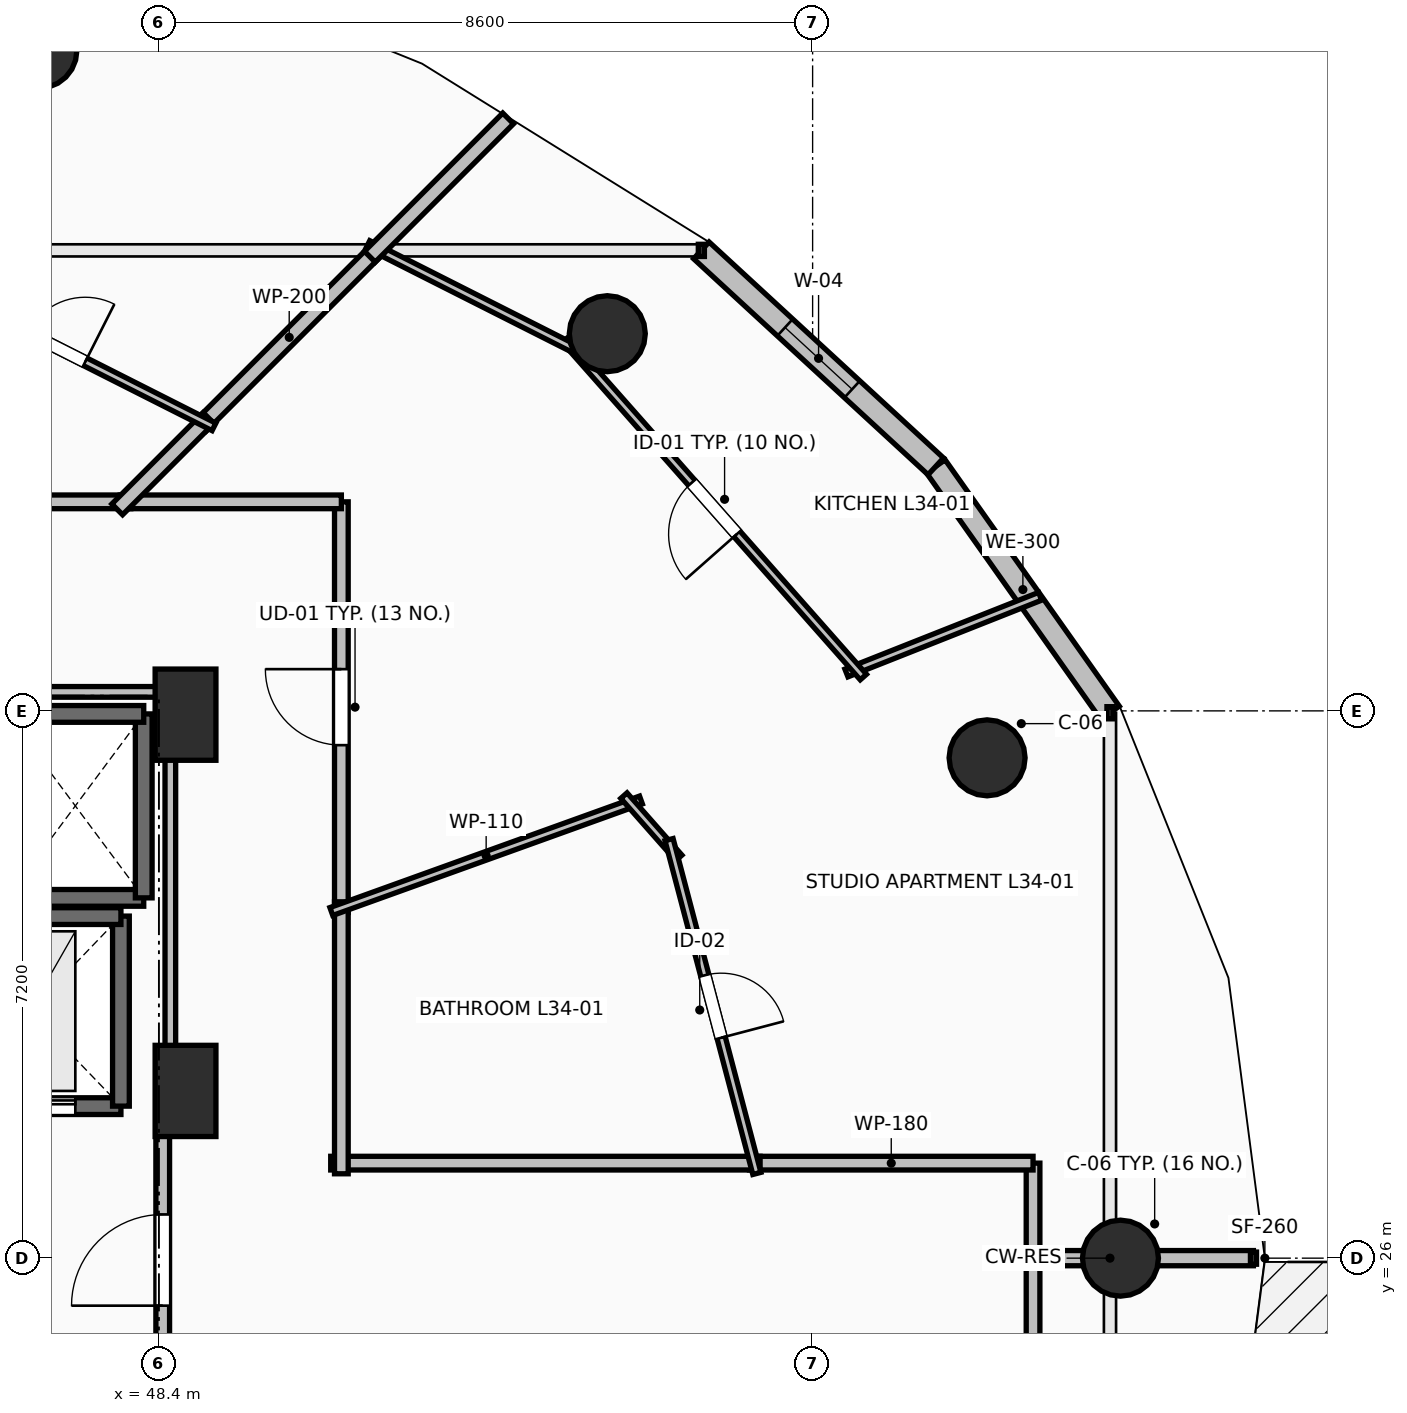
"""IFC4 building model, lengths in metres.
Left out: names, types, materials, properties, quantities, classifications, styles, units other than length and angle.
Written with IfcOpenShell. Run it as: python <this file> out.ifc"""

import sys

from ifc_helpers import new_model, si_unit, direction, frame, frame_2d, origin, origin_2d, place, context, subcontext, project, spatial, rectangle, circle, extrude, element, fill, save


model = new_model("IFC4")
c1 = context("Model", 3, precision=1e-05, world=origin(), true_north=direction((0.0, 1.0)))
c2 = subcontext(c1, "Body", "Model", "MODEL_VIEW")
j1 = project(units=[si_unit("LENGTHUNIT", "METRE"), si_unit("PLANEANGLEUNIT", "RADIAN")], contexts=[c1])
p1 = place(None, origin())
s1 = spatial("IfcSite", under=j1, at=p1, CompositionType="ELEMENT")
p2 = place(p1, origin())
s2 = spatial("IfcBuilding", under=s1, at=p2, CompositionType="ELEMENT")
p3 = place(p2, frame((0.0, 0.0, 129.1)))
s3 = spatial("IfcBuildingStorey", under=s2, at=p3, CompositionType="ELEMENT", Elevation=129.1)
for number, where, z_axis, x_axis in (
    (1, (61.05, 26.0, 0.0), (0.0, 0.0, 1.0), (1.0, 0.0, 0.0)),
    (2, (59.295, 32.582, 0.0), (0.0, 0.0, 1.0), (0.924, 0.383, 0.0)),
    (3, (54.299, 38.162, 0.0), (0.0, 0.0, 1.0), (0.707, 0.707, 0.0)),
    (4, (46.821, 41.891, 0.0), (0.0, 0.0, 1.0), (0.383, 0.924, 0.0)),
):
    element("IfcColumn", number, at=place(p3, frame(where, z_axis=z_axis, x_axis=x_axis)), inside=s3, PredefinedType="COLUMN", context=c2, shape_type="SweptSolid", body=[
        extrude(circle(Radius=0.5, at=origin_2d()), origin(), (0.0, 0.0, 1.0), 3.5),
    ])
for number, where, z_axis, x_axis in (
    (5, (48.75, 33.15, 0.0), (0.0, 0.0, 1.0), (1.0, 0.0, 0.0)),
    (6, (48.75, 28.2, 0.0), (0.0, 0.0, 1.0), (1.0, 0.0, 0.0)),
):
    element("IfcColumn", number, at=place(p3, frame(where, z_axis=z_axis, x_axis=x_axis)), inside=s3, PredefinedType="PILASTER", context=c2, shape_type="SweptSolid", body=[
        extrude(rectangle(XDim=0.8, YDim=1.2, at=origin_2d()), origin(), (0.0, 0.0, 1.0), 3.5),
    ])
p4 = place(p3, frame((60.912, 33.175, 0.0), z_axis=(0.0, 0.0, 1.0), x_axis=(-0.577269753207, 0.816553508371, 0.0)))
e7 = element("IfcWall", 7, at=p4, inside=s3, PredefinedType="STANDARD", context=c2, shape_type="SweptSolid", body=[
    extrude(rectangle(XDim=3.97, YDim=0.3, at=frame_2d((1.985, 0.0))), origin(), (0.0, 0.0, 1.0), 3.24),
])
p5 = place(p3, frame((58.62, 36.417, 0.0), z_axis=(0.0, 0.0, 1.0), x_axis=(-0.735477154165, 0.677549522693, 0.0)))
e8 = element("IfcWall", 8, at=p5, inside=s3, PredefinedType="STANDARD", context=c2, shape_type="SweptSolid", body=[
    extrude(rectangle(XDim=4.194, YDim=0.3, at=frame_2d((2.097, 0.0))), origin(), (0.0, 0.0, 1.0), 3.24),
])
p6 = place(p5, frame((1.497, 0.0, 0.85)))
e9 = element("IfcOpeningElement", 9, at=p6, cuts=e8, PredefinedType="OPENING", context=c2, shape_type="SweptSolid", body=[
    extrude(rectangle(XDim=1.2, YDim=2.1, at=frame_2d((0.6, 1.05))), frame((0.0, 0.165, 0.0), z_axis=(0.0, -1.0, 0.0), x_axis=(1.0, 0.0, 0.0)), (0.0, 0.0, 1.0), 0.33),
])
p7 = place(p3, frame((46.4, 30.74, 0.0), z_axis=(0.0, 0.0, 1.0), x_axis=(1.0, 0.0, 0.0)))
e10 = element("IfcWall", 10, at=p7, inside=s3, PredefinedType="SOLIDWALL", context=c2, shape_type="SweptSolid", body=[
    extrude(rectangle(XDim=1.8, YDim=0.22, at=frame_2d((0.9, 0.0))), origin(), (0.0, 0.0, 1.0), 3.24),
])
p8 = place(p3, frame((48.2, 30.74, 0.0), z_axis=(0.0, 0.0, 1.0), x_axis=(0.0, 1.0, 0.0)))
e11 = element("IfcWall", 11, at=p8, inside=s3, PredefinedType="SOLIDWALL", context=c2, shape_type="SweptSolid", body=[
    extrude(rectangle(XDim=2.42, YDim=0.22, at=frame_2d((1.21, 0.0))), origin(), (0.0, 0.0, 1.0), 3.24),
])
p9 = place(p3, frame((48.2, 33.16, 0.0), z_axis=(0.0, 0.0, 1.0), x_axis=(-1.0, 0.0, 0.0)))
e12 = element("IfcWall", 12, at=p9, inside=s3, PredefinedType="SOLIDWALL", context=c2, shape_type="SweptSolid", body=[
    extrude(rectangle(XDim=1.8, YDim=0.22, at=frame_2d((0.9, 0.0))), origin(), (0.0, 0.0, 1.0), 3.24),
])
p10 = place(p3, frame((45.5, 28.0, 0.0), z_axis=(0.0, 0.0, 1.0), x_axis=(1.0, 0.0, 0.0)))
e13 = element("IfcWall", 13, at=p10, inside=s3, PredefinedType="SHEAR", context=c2, shape_type="SweptSolid", body=[
    extrude(rectangle(XDim=2.4, YDim=0.22, at=frame_2d((1.2, 0.0))), origin(), (0.0, 0.0, 1.0), 3.24),
])
p11 = place(p10, frame((0.6, 0.0, 0.0)))
e14 = element("IfcOpeningElement", 14, at=p11, cuts=e13, PredefinedType="OPENING", context=c2, shape_type="SweptSolid", body=[
    extrude(rectangle(XDim=1.2, YDim=2.2, at=frame_2d((0.6, 1.1))), frame((0.0, 0.125, 0.0), z_axis=(0.0, -1.0, 0.0), x_axis=(1.0, 0.0, 0.0)), (0.0, 0.0, 1.0), 0.25),
])
p12 = place(p3, frame((47.9, 28.0, 0.0), z_axis=(0.0, 0.0, 1.0), x_axis=(0.0, 1.0, 0.0)))
e15 = element("IfcWall", 15, at=p12, inside=s3, PredefinedType="SHEAR", context=c2, shape_type="SweptSolid", body=[
    extrude(rectangle(XDim=2.5, YDim=0.22, at=frame_2d((1.25, 0.0))), origin(), (0.0, 0.0, 1.0), 3.24),
])
p13 = place(p3, frame((47.9, 30.5, 0.0), z_axis=(0.0, 0.0, 1.0), x_axis=(-1.0, 0.0, 0.0)))
e16 = element("IfcWall", 16, at=p13, inside=s3, PredefinedType="SHEAR", context=c2, shape_type="SweptSolid", body=[
    extrude(rectangle(XDim=2.4, YDim=0.22, at=frame_2d((1.2, 0.0))), origin(), (0.0, 0.0, 1.0), 3.24),
])
p14 = place(p3, frame((48.45, 23.95, 0.0), z_axis=(0.0, 0.0, 1.0), x_axis=(0.0, 1.0, 0.0)))
e17 = element("IfcWall", 17, at=p14, inside=s3, PredefinedType="PARTITIONING", context=c2, shape_type="SweptSolid", body=[
    extrude(rectangle(XDim=4.05, YDim=0.18, at=frame_2d((2.025, 0.0))), origin(), (0.0, 0.0, 1.0), 3.24),
])
p15 = place(p14, frame((1.425, 0.0, 0.0)))
e18 = element("IfcOpeningElement", 18, at=p15, cuts=e17, PredefinedType="OPENING", context=c2, shape_type="SweptSolid", body=[
    extrude(rectangle(XDim=1.2, YDim=2.15, at=frame_2d((0.6, 1.075))), frame((0.0, 0.105, 0.0), z_axis=(0.0, -1.0, 0.0), x_axis=(1.0, 0.0, 0.0)), (0.0, 0.0, 1.0), 0.21),
])
p16 = place(p3, frame((59.9, 25.94, 0.0), z_axis=(0.0, 0.0, 1.0), x_axis=(0.0, 1.0, 0.0)))
e19 = element("IfcWall", 19, at=p16, inside=s3, PredefinedType="PARTITIONING", context=c2, shape_type="SweptSolid", body=[
    extrude(rectangle(XDim=1.31, YDim=0.18, at=frame_2d((0.655, 0.0))), origin(), (0.0, 0.0, 1.0), 2.432),
])
p17 = place(p3, frame((59.9, 27.25, 0.0), z_axis=(0.0, 0.0, 1.0), x_axis=(-1.0, 0.0, 0.0)))
e20 = element("IfcWall", 20, at=p17, inside=s3, PredefinedType="PARTITIONING", context=c2, shape_type="SweptSolid", body=[
    extrude(rectangle(XDim=3.731, YDim=0.18, at=frame_2d((1.865, 0.0))), origin(), (0.0, 0.0, 1.0), 2.874),
])
p18 = place(p3, frame((50.8, 30.548, 0.0), z_axis=(0.0, 0.0, 1.0), x_axis=(0.0, 1.0, 0.0)))
e21 = element("IfcWall", 21, at=p18, inside=s3, PredefinedType="PARTITIONING", context=c2, shape_type="SweptSolid", body=[
    extrude(rectangle(XDim=5.402, YDim=0.18, at=frame_2d((2.701, 0.0))), origin(), (0.0, 0.0, 1.0), 2.432),
])
p19 = place(p18, frame((2.201, 0.0, 0.0)))
e22 = element("IfcOpeningElement", 22, at=p19, cuts=e21, PredefinedType="OPENING", context=c2, shape_type="SweptSolid", body=[
    extrude(rectangle(XDim=1.0, YDim=2.15, at=frame_2d((0.5, 1.075))), frame((0.0, 0.105, 0.0), z_axis=(0.0, -1.0, 0.0), x_axis=(1.0, 0.0, 0.0)), (0.0, 0.0, 1.0), 0.21),
])
p20 = place(p3, frame((50.8, 35.95, 0.0), z_axis=(0.0, 0.0, 1.0), x_axis=(-1.0, 0.0, 0.0)))
e23 = element("IfcWall", 23, at=p20, inside=s3, PredefinedType="PARTITIONING", context=c2, shape_type="SweptSolid", body=[
    extrude(rectangle(XDim=2.91, YDim=0.18, at=frame_2d((1.455, 0.0))), origin(), (0.0, 0.0, 1.0), 2.432),
])
p21 = place(p3, frame((56.309, 27.25, 0.0), z_axis=(0.0, 0.0, 1.0), x_axis=(-1.0, 0.0, 0.0)))
e24 = element("IfcWall", 24, at=p21, inside=s3, PredefinedType="PARTITIONING", context=c2, shape_type="SweptSolid", body=[
    extrude(rectangle(XDim=5.649, YDim=0.18, at=frame_2d((2.825, 0.0))), origin(), (0.0, 0.0, 1.0), 2.432),
])
p22 = place(p3, frame((50.8, 27.11, 0.0), z_axis=(0.0, 0.0, 1.0), x_axis=(0.0, 1.0, 0.0)))
e25 = element("IfcWall", 25, at=p22, inside=s3, PredefinedType="PARTITIONING", context=c2, shape_type="SweptSolid", body=[
    extrude(rectangle(XDim=3.578, YDim=0.18, at=frame_2d((1.789, 0.0))), origin(), (0.0, 0.0, 1.0), 2.432),
])
p23 = place(p3, frame((48.03, 35.95, 0.0), z_axis=(0.0, 0.0, 1.0), x_axis=(-1.0, 0.0, 0.0)))
e26 = element("IfcWall", 26, at=p23, inside=s3, PredefinedType="PARTITIONING", context=c2, shape_type="SweptSolid", body=[
    extrude(rectangle(XDim=5.422, YDim=0.18, at=frame_2d((2.711, 0.0))), origin(), (0.0, 0.0, 1.0), 2.432),
])
p24 = place(p3, frame((59.9, 24.55, 0.0), z_axis=(0.0, 0.0, 1.0), x_axis=(0.0, 1.0, 0.0)))
e27 = element("IfcWall", 27, at=p24, inside=s3, PredefinedType="PARTITIONING", context=c2, shape_type="SweptSolid", body=[
    extrude(rectangle(XDim=1.39, YDim=0.18, at=frame_2d((0.695, 0.0))), origin(), (0.0, 0.0, 1.0), 2.432),
])
p25 = place(p3, frame((50.668, 30.561, 0.0), z_axis=(0.0, 0.0, 1.0), x_axis=(0.94086224956, 0.33878935543, 0.0)))
e28 = element("IfcWall", 28, at=p25, inside=s3, PredefinedType="PARTITIONING", context=c2, shape_type="SweptSolid", body=[
    extrude(rectangle(XDim=4.33, YDim=0.11, at=frame_2d((2.165, 0.0))), origin(), (0.0, 0.0, 1.0), 2.922),
])
p26 = place(p3, frame((54.517, 32.085, 0.0), z_axis=(0.0, 0.0, 1.0), x_axis=(0.661444121134, -0.749994449724, 0.0)))
e29 = element("IfcWall", 29, at=p26, inside=s3, PredefinedType="PARTITIONING", context=c2, shape_type="SweptSolid", body=[
    extrude(rectangle(XDim=1.092, YDim=0.11, at=frame_2d((0.546, 0.0))), origin(), (0.0, 0.0, 1.0), 3.24),
])
p27 = place(p3, frame((55.111, 31.506, 0.0), z_axis=(0.0, 0.0, 1.0), x_axis=(0.254395386743, -0.96710029842, 0.0)))
e30 = element("IfcWall", 30, at=p27, inside=s3, PredefinedType="PARTITIONING", context=c2, shape_type="SweptSolid", body=[
    extrude(rectangle(XDim=4.541, YDim=0.11, at=frame_2d((2.271, 0.0))), origin(), (0.0, 0.0, 1.0), 2.432),
])
p28 = place(p27, frame((1.846, 0.0, 0.0)))
e31 = element("IfcOpeningElement", 31, at=p28, cuts=e30, PredefinedType="OPENING", context=c2, shape_type="SweptSolid", body=[
    extrude(rectangle(XDim=0.85, YDim=2.1, at=frame_2d((0.425, 1.05))), frame((0.0, 0.07, 0.0), z_axis=(0.0, -1.0, 0.0), x_axis=(1.0, 0.0, 0.0)), (0.0, 0.0, 1.0), 0.14),
])
p29 = place(p3, frame((59.993, 34.708, 0.0), z_axis=(0.0, 0.0, 1.0), x_axis=(-0.92976723416, -0.368147919025, 0.0)))
e32 = element("IfcWall", 32, at=p29, inside=s3, PredefinedType="PARTITIONING", context=c2, shape_type="SweptSolid", body=[
    extrude(rectangle(XDim=2.741, YDim=0.11, at=frame_2d((1.37, 0.0))), origin(), (0.0, 0.0, 1.0), 2.728),
])
p30 = place(p3, frame((57.668, 33.645, 0.0), z_axis=(0.0, 0.0, 1.0), x_axis=(-0.66214504072, 0.749375703536, 0.0)))
e33 = element("IfcWall", 33, at=p30, inside=s3, PredefinedType="PARTITIONING", context=c2, shape_type="SweptSolid", body=[
    extrude(rectangle(XDim=5.922, YDim=0.11, at=frame_2d((2.961, 0.0))), origin(), (0.0, 0.0, 1.0), 2.432),
])
p31 = place(p30, frame((2.511, 0.0, 0.0)))
e34 = element("IfcOpeningElement", 34, at=p31, cuts=e33, PredefinedType="OPENING", context=c2, shape_type="SweptSolid", body=[
    extrude(rectangle(XDim=0.9, YDim=2.1, at=frame_2d((0.45, 1.05))), frame((0.0, 0.07, 0.0), z_axis=(0.0, -1.0, 0.0), x_axis=(1.0, 0.0, 0.0)), (0.0, 0.0, 1.0), 0.14),
])
p32 = place(p3, frame((53.964, 37.915, 0.0), z_axis=(0.0, 0.0, 1.0), x_axis=(-0.892546166909, 0.450956028828, 0.0)))
e35 = element("IfcWall", 35, at=p32, inside=s3, PredefinedType="PARTITIONING", context=c2, shape_type="SweptSolid", body=[
    extrude(rectangle(XDim=3.154, YDim=0.11, at=frame_2d((1.577, 0.0))), origin(), (0.0, 0.0, 1.0), 2.432),
])
p33 = place(p3, frame((51.274, 39.274, 0.0), z_axis=(0.0, 0.0, 1.0), x_axis=(-0.707106781187, -0.707106781187, 0.0)))
e36 = element("IfcWall", 36, at=p33, inside=s3, PredefinedType="PARTITIONING", context=c2, shape_type="SweptSolid", body=[
    extrude(rectangle(XDim=3.281, YDim=0.2, at=frame_2d((1.64, 0.0))), origin(), (0.0, 0.0, 1.0), 2.874),
])
p34 = place(p3, frame((49.053, 37.053, 0.0), z_axis=(0.0, 0.0, 1.0), x_axis=(-0.707106781187, -0.707106781187, 0.0)))
e37 = element("IfcWall", 37, at=p34, inside=s3, PredefinedType="PARTITIONING", context=c2, shape_type="SweptSolid", body=[
    extrude(rectangle(XDim=1.7, YDim=0.2, at=frame_2d((0.85, 0.0))), origin(), (0.0, 0.0, 1.0), 2.432),
])
p35 = place(p3, frame((59.9, 26.0, 0.0), z_axis=(0.0, 0.0, 1.0), x_axis=(1.0, 0.0, 0.0)))
e38 = element("IfcWall", 38, at=p35, inside=s3, PredefinedType="PARTITIONING", context=c2, shape_type="SweptSolid", body=[
    extrude(rectangle(XDim=2.899, YDim=0.2, at=frame_2d((1.45, 0.0))), origin(), (0.0, 0.0, 1.0), 2.432),
])
p36 = place(p3, frame((52.994, 40.994, 0.0), z_axis=(0.0, 0.0, 1.0), x_axis=(-0.707106781187, -0.707106781187, 0.0)))
e39 = element("IfcWall", 39, at=p36, inside=s3, PredefinedType="PARTITIONING", context=c2, shape_type="SweptSolid", body=[
    extrude(rectangle(XDim=2.572, YDim=0.2, at=frame_2d((1.286, 0.0))), origin(), (0.0, 0.0, 1.0), 2.728),
])
p37 = place(p3, frame((44.978, 39.031, 0.0), z_axis=(0.0, 0.0, 1.0), x_axis=(0.892495276856, -0.451056737882, 0.0)))
e40 = element("IfcWall", 40, at=p37, inside=s3, PredefinedType="PARTITIONING", context=c2, shape_type="SweptSolid", body=[
    extrude(rectangle(XDim=4.645, YDim=0.11, at=frame_2d((2.323, 0.0))), origin(), (0.0, 0.0, 1.0), 2.432),
])
p38 = place(p37, frame((1.898, 0.0, 0.0)))
e41 = element("IfcOpeningElement", 41, at=p38, cuts=e40, PredefinedType="OPENING", context=c2, shape_type="SweptSolid", body=[
    extrude(rectangle(XDim=0.85, YDim=2.1, at=frame_2d((0.425, 1.05))), frame((0.0, 0.07, 0.0), z_axis=(0.0, -1.0, 0.0), x_axis=(1.0, 0.0, 0.0)), (0.0, 0.0, 1.0), 0.14),
])
p39 = place(p3, frame((48.55, 28.196, 0.0), z_axis=(0.0, 0.0, 1.0), x_axis=(0.0, 1.0, 0.0)))
e42 = element("IfcWall", 42, at=p39, inside=s3, PredefinedType="PARTITIONING", context=c2, shape_type="SweptSolid", body=[
    extrude(rectangle(XDim=5.254, YDim=0.14, at=frame_2d((2.627, 0.0))), origin(), (0.0, 0.0, 1.0), 2.432),
])
p40 = place(p3, frame((48.55, 33.45, 0.0), z_axis=(0.0, 0.0, 1.0), x_axis=(-1.0, 0.0, 0.0)))
e43 = element("IfcWall", 43, at=p40, inside=s3, PredefinedType="PARTITIONING", context=c2, shape_type="SweptSolid", body=[
    extrude(rectangle(XDim=4.21, YDim=0.14, at=frame_2d((2.105, 0.0))), origin(), (0.0, 0.0, 1.0), 2.432),
])
p41 = place(p6, origin())
e44 = element("IfcWindow", 44, at=p41, inside=s3, PartitioningType="SINGLE_PANEL", PredefinedType="WINDOW", context=c2, shape_type="SweptSolid", body=[
    extrude(rectangle(XDim=1.2, YDim=2.1, at=frame_2d((0.6, 1.05))), frame((0.0, 0.03, 0.0), z_axis=(0.0, -1.0, 0.0), x_axis=(1.0, 0.0, 0.0)), (0.0, 0.0, 1.0), 0.06),
])
fill(e9, e44)
p42 = place(p11, origin())
e45 = element("IfcDoor", 45, at=p42, inside=s3, OperationType="SLIDING_TO_LEFT", PredefinedType="DOOR", context=c2, shape_type="SweptSolid", body=[
    extrude(rectangle(XDim=1.2, YDim=2.2, at=frame_2d((0.6, 1.1))), frame((0.0, 0.025, 0.0), z_axis=(0.0, -1.0, 0.0), x_axis=(1.0, 0.0, 0.0)), (0.0, 0.0, 1.0), 0.05),
])
fill(e14, e45)
p43 = place(p15, origin())
e46 = element("IfcDoor", 46, at=p43, inside=s3, OperationType="SINGLE_SWING_LEFT", PredefinedType="DOOR", context=c2, shape_type="SweptSolid", body=[
    extrude(rectangle(XDim=1.2, YDim=2.15, at=frame_2d((0.6, 1.075))), frame((0.0, 0.025, 0.0), z_axis=(0.0, -1.0, 0.0), x_axis=(1.0, 0.0, 0.0)), (0.0, 0.0, 1.0), 0.05),
])
fill(e18, e46)
p44 = place(p19, origin())
e47 = element("IfcDoor", 47, at=p44, inside=s3, OperationType="SINGLE_SWING_RIGHT", PredefinedType="DOOR", context=c2, shape_type="SweptSolid", body=[
    extrude(rectangle(XDim=1.0, YDim=2.15, at=frame_2d((0.5, 1.075))), frame((0.0, 0.025, 0.0), z_axis=(0.0, -1.0, 0.0), x_axis=(1.0, 0.0, 0.0)), (0.0, 0.0, 1.0), 0.05),
])
fill(e22, e47)
p45 = place(p28, origin())
e48 = element("IfcDoor", 48, at=p45, inside=s3, OperationType="SINGLE_SWING_RIGHT", PredefinedType="DOOR", context=c2, shape_type="SweptSolid", body=[
    extrude(rectangle(XDim=0.85, YDim=2.1, at=frame_2d((0.425, 1.05))), frame((0.0, 0.025, 0.0), z_axis=(0.0, -1.0, 0.0), x_axis=(1.0, 0.0, 0.0)), (0.0, 0.0, 1.0), 0.05),
])
fill(e31, e48)
p46 = place(p31, origin())
e49 = element("IfcDoor", 49, at=p46, inside=s3, OperationType="SINGLE_SWING_LEFT", PredefinedType="DOOR", context=c2, shape_type="SweptSolid", body=[
    extrude(rectangle(XDim=0.9, YDim=2.1, at=frame_2d((0.45, 1.05))), frame((0.0, 0.025, 0.0), z_axis=(0.0, -1.0, 0.0), x_axis=(1.0, 0.0, 0.0)), (0.0, 0.0, 1.0), 0.05),
])
fill(e34, e49)
p47 = place(p38, origin())
e50 = element("IfcDoor", 50, at=p47, inside=s3, OperationType="SINGLE_SWING_RIGHT", PredefinedType="DOOR", context=c2, shape_type="SweptSolid", body=[
    extrude(rectangle(XDim=0.85, YDim=2.1, at=frame_2d((0.425, 1.05))), frame((0.0, 0.025, 0.0), z_axis=(0.0, -1.0, 0.0), x_axis=(1.0, 0.0, 0.0)), (0.0, 0.0, 1.0), 0.05),
])
fill(e41, e50)
save(model, sys.argv[1])
